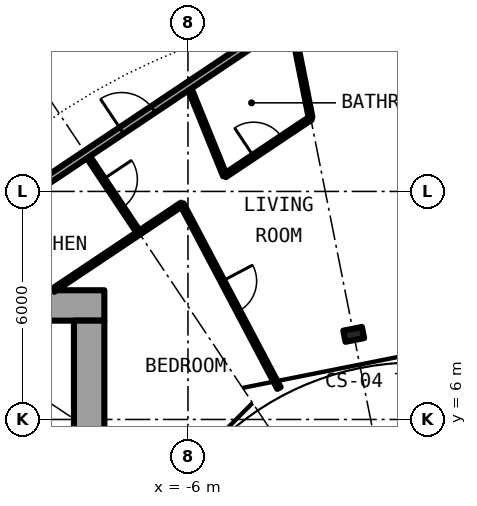
"""IFC4 building model, lengths in metres.
Left out: names, types, materials, properties, quantities, classifications, styles, units other than length and angle.
Written with IfcOpenShell. Run it as: python <this file> out.ifc"""

import sys

from ifc_helpers import new_model, si_unit, direction, frame, frame_2d, origin, origin_2d, place, context, subcontext, project, spatial, rectangle, i_section, extrude, element, fill, save


model = new_model("IFC4")
c1 = context("Model", 3, precision=1e-05, world=origin(), true_north=direction((0.0, 1.0)))
c2 = subcontext(c1, "Body", "Model", "MODEL_VIEW")
j1 = project(units=[si_unit("LENGTHUNIT", "METRE"), si_unit("PLANEANGLEUNIT", "RADIAN")], contexts=[c1])
p1 = place(None, origin())
s1 = spatial("IfcSite", under=j1, at=p1, CompositionType="ELEMENT")
p2 = place(p1, origin())
s2 = spatial("IfcBuilding", under=s1, at=p2, CompositionType="ELEMENT")
p3 = place(p2, frame((0.0, 0.0, 28.9)))
s3 = spatial("IfcBuildingStorey", under=s2, at=p3, CompositionType="ELEMENT", Elevation=28.9)
p4 = place(p3, frame((-1.639, 8.239, 0.0), z_axis=(0.0, 0.0, 1.0), x_axis=(-0.195090322016, 0.980785280403, 0.0)))
e1 = element("IfcColumn", 1, at=p4, inside=s3, PredefinedType="COLUMN", context=c2, shape_type="SweptSolid", body=[
    extrude(i_section(OverallWidth=0.3, OverallDepth=0.5, WebThickness=0.014, FlangeThickness=0.028, FilletRadius=0.027, at=origin_2d()), origin(), (0.0, 0.0, 1.0), 3.05),
])
p5 = place(p3, frame((-8.2, 9.0, 0.0), z_axis=(0.0, 0.0, 1.0), x_axis=(-1.0, 0.0, 0.0)))
e2 = element("IfcWall", 2, at=p5, inside=s3, PredefinedType="SHEAR", context=c2, shape_type="SweptSolid", body=[
    extrude(rectangle(XDim=14.2, YDim=0.8, at=frame_2d((7.1, 0.0))), origin(), (0.0, 0.0, 1.0), 3.05),
])
p6 = place(p5, frame((11.675, 0.0, 0.0)))
e3 = element("IfcOpeningElement", 3, at=p6, cuts=e2, PredefinedType="OPENING", context=c2, shape_type="SweptSolid", body=[
    extrude(rectangle(XDim=1.2, YDim=2.3, at=frame_2d((0.6, 1.15))), frame((0.0, 0.41, 0.0), z_axis=(0.0, -1.0, 0.0), x_axis=(1.0, 0.0, 0.0)), (0.0, 0.0, 1.0), 0.82),
])
p7 = place(p3, frame((-8.6, 8.6, 0.0), z_axis=(0.0, 0.0, 1.0), x_axis=(0.0, -1.0, 0.0)))
e4 = element("IfcWall", 4, at=p7, inside=s3, PredefinedType="SHEAR", context=c2, shape_type="SweptSolid", body=[
    extrude(rectangle(XDim=17.2, YDim=0.8, at=frame_2d((8.6, 0.0))), origin(), (0.0, 0.0, 1.0), 3.05),
])
p8 = place(p7, frame((7.4, 0.0, 0.1)))
e5 = element("IfcOpeningElement", 5, at=p8, cuts=e4, PredefinedType="OPENING", context=c2, shape_type="SweptSolid", body=[
    extrude(rectangle(XDim=2.4, YDim=2.2, at=frame_2d((1.2, 1.1))), frame((0.0, 0.41, 0.0), z_axis=(0.0, -1.0, 0.0), x_axis=(1.0, 0.0, 0.0)), (0.0, 0.0, 1.0), 0.82),
])
p9 = place(p3, frame((-8.674, 12.982, 0.0), z_axis=(0.0, 0.0, 1.0), x_axis=(0.555355163998, -0.831613276602, 0.0)))
e6 = element("IfcWall", 6, at=p9, inside=s3, PredefinedType="PARTITIONING", context=c2, shape_type="SweptSolid", body=[
    extrude(rectangle(XDim=2.494, YDim=0.1, at=frame_2d((1.247, 0.0))), origin(), (0.0, 0.0, 1.0), 2.7),
])
p10 = place(p9, frame((0.797, 0.0, 0.0)))
e7 = element("IfcOpeningElement", 7, at=p10, cuts=e6, PredefinedType="OPENING", context=c2, shape_type="SweptSolid", body=[
    extrude(rectangle(XDim=0.9, YDim=2.3, at=frame_2d((0.45, 1.15))), frame((0.0, 0.06, 0.0), z_axis=(0.0, -1.0, 0.0), x_axis=(1.0, 0.0, 0.0)), (0.0, 0.0, 1.0), 0.12),
])
p11 = place(p3, frame((-6.16, 11.663, 0.0), z_axis=(0.0, 0.0, 1.0), x_axis=(0.466976820365, -0.884269556889, 0.0)))
e8 = element("IfcWall", 8, at=p11, inside=s3, PredefinedType="PARTITIONING", context=c2, shape_type="SweptSolid", body=[
    extrude(rectangle(XDim=5.469, YDim=0.1, at=frame_2d((2.735, 0.0))), origin(), (0.0, 0.0, 1.0), 2.7),
])
p12 = place(p11, frame((2.285, 0.0, 0.0)))
e9 = element("IfcOpeningElement", 9, at=p12, cuts=e8, PredefinedType="OPENING", context=c2, shape_type="SweptSolid", body=[
    extrude(rectangle(XDim=0.9, YDim=2.3, at=frame_2d((0.45, 1.15))), frame((0.0, 0.06, 0.0), z_axis=(0.0, -1.0, 0.0), x_axis=(1.0, 0.0, 0.0)), (0.0, 0.0, 1.0), 0.12),
])
p13 = place(p3, frame((-5.986, 14.779, 0.0), z_axis=(0.0, 0.0, 1.0), x_axis=(0.375649498413, -0.926761811008, 0.0)))
e10 = element("IfcWall", 10, at=p13, inside=s3, PredefinedType="PARTITIONING", context=c2, shape_type="SweptSolid", body=[
    extrude(rectangle(XDim=2.548, YDim=0.1, at=frame_2d((1.274, 0.0))), origin(), (0.0, 0.0, 1.0), 2.7),
])
p14 = place(p3, frame((-9.546, 9.4, 0.0), z_axis=(0.0, 0.0, 1.0), x_axis=(0.831459707426, 0.555585056429, 0.0)))
e11 = element("IfcWall", 11, at=p14, inside=s3, PredefinedType="PARTITIONING", context=c2, shape_type="SweptSolid", body=[
    extrude(rectangle(XDim=4.073, YDim=0.1, at=frame_2d((2.037, 0.0))), origin(), (0.0, 0.0, 1.0), 2.7),
])
p15 = place(p3, frame((-5.03, 12.417, 0.0), z_axis=(0.0, 0.0, 1.0), x_axis=(0.831538390496, 0.555467285384, 0.0)))
e12 = element("IfcWall", 12, at=p15, inside=s3, PredefinedType="PARTITIONING", context=c2, shape_type="SweptSolid", body=[
    extrude(rectangle(XDim=2.717, YDim=0.1, at=frame_2d((1.358, 0.0))), origin(), (0.0, 0.0, 1.0), 2.7),
])
p16 = place(p15, frame((0.91, 0.0, 0.0)))
e13 = element("IfcOpeningElement", 13, at=p16, cuts=e12, PredefinedType="OPENING", context=c2, shape_type="SweptSolid", body=[
    extrude(rectangle(XDim=0.9, YDim=2.3, at=frame_2d((0.45, 1.15))), frame((0.0, 0.06, 0.0), z_axis=(0.0, -1.0, 0.0), x_axis=(1.0, 0.0, 0.0)), (0.0, 0.0, 1.0), 0.12),
])
p17 = place(p3, frame((-14.039, 9.396, 0.0), z_axis=(0.0, 0.0, 1.0), x_axis=(0.831348689697, 0.555751163866, 0.0)))
e14 = element("IfcWall", 14, at=p17, inside=s3, PredefinedType="PARTITIONING", context=c2, shape_type="SweptSolid", body=[
    extrude(rectangle(XDim=12.914, YDim=0.2, at=frame_2d((6.457, 0.0))), origin(), (0.0, 0.0, 1.0), 2.7),
])
p18 = place(p17, frame((7.568, 0.0, 0.0)))
e15 = element("IfcOpeningElement", 15, at=p18, cuts=e14, PredefinedType="OPENING", context=c2, shape_type="SweptSolid", body=[
    extrude(rectangle(XDim=1.0, YDim=2.3, at=frame_2d((0.5, 1.15))), frame((0.0, 0.11, 0.0), z_axis=(0.0, -1.0, 0.0), x_axis=(1.0, 0.0, 0.0)), (0.0, 0.0, 1.0), 0.22),
])
p19 = place(p3, frame((-3.293, 16.554, 0.0), z_axis=(0.0, 0.0, 1.0), x_axis=(0.195338620417, -0.980735858105, 0.0)))
e16 = element("IfcWall", 16, at=p19, inside=s3, PredefinedType="PARTITIONING", context=c2, shape_type="SweptSolid", body=[
    extrude(rectangle(XDim=2.657, YDim=0.1, at=frame_2d((1.329, 0.0))), origin(), (0.0, 0.0, 1.0), 2.7),
])
p20 = place(p18, origin())
e17 = element("IfcDoor", 17, at=p20, inside=s3, OperationType="SINGLE_SWING_RIGHT", PredefinedType="DOOR", context=c2, shape_type="SweptSolid", body=[
    extrude(rectangle(XDim=1.0, YDim=2.3, at=frame_2d((0.5, 1.15))), frame((0.0, 0.025, 0.0), z_axis=(0.0, -1.0, 0.0), x_axis=(1.0, 0.0, 0.0)), (0.0, 0.0, 1.0), 0.05),
])
fill(e15, e17)
p21 = place(p16, origin())
e18 = element("IfcDoor", 18, at=p21, inside=s3, OperationType="SINGLE_SWING_RIGHT", PredefinedType="DOOR", context=c2, shape_type="SweptSolid", body=[
    extrude(rectangle(XDim=0.9, YDim=2.3, at=frame_2d((0.45, 1.15))), frame((0.0, 0.025, 0.0), z_axis=(0.0, -1.0, 0.0), x_axis=(1.0, 0.0, 0.0)), (0.0, 0.0, 1.0), 0.05),
])
fill(e13, e18)
p22 = place(p10, origin())
e19 = element("IfcDoor", 19, at=p22, inside=s3, OperationType="SINGLE_SWING_RIGHT", PredefinedType="DOOR", context=c2, shape_type="SweptSolid", body=[
    extrude(rectangle(XDim=0.9, YDim=2.3, at=frame_2d((0.45, 1.15))), frame((0.0, 0.025, 0.0), z_axis=(0.0, -1.0, 0.0), x_axis=(1.0, 0.0, 0.0)), (0.0, 0.0, 1.0), 0.05),
])
fill(e7, e19)
p23 = place(p12, origin())
e20 = element("IfcDoor", 20, at=p23, inside=s3, OperationType="SINGLE_SWING_RIGHT", PredefinedType="DOOR", context=c2, shape_type="SweptSolid", body=[
    extrude(rectangle(XDim=0.9, YDim=2.3, at=frame_2d((0.45, 1.15))), frame((0.0, 0.025, 0.0), z_axis=(0.0, -1.0, 0.0), x_axis=(1.0, 0.0, 0.0)), (0.0, 0.0, 1.0), 0.05),
])
fill(e9, e20)
save(model, sys.argv[1])
